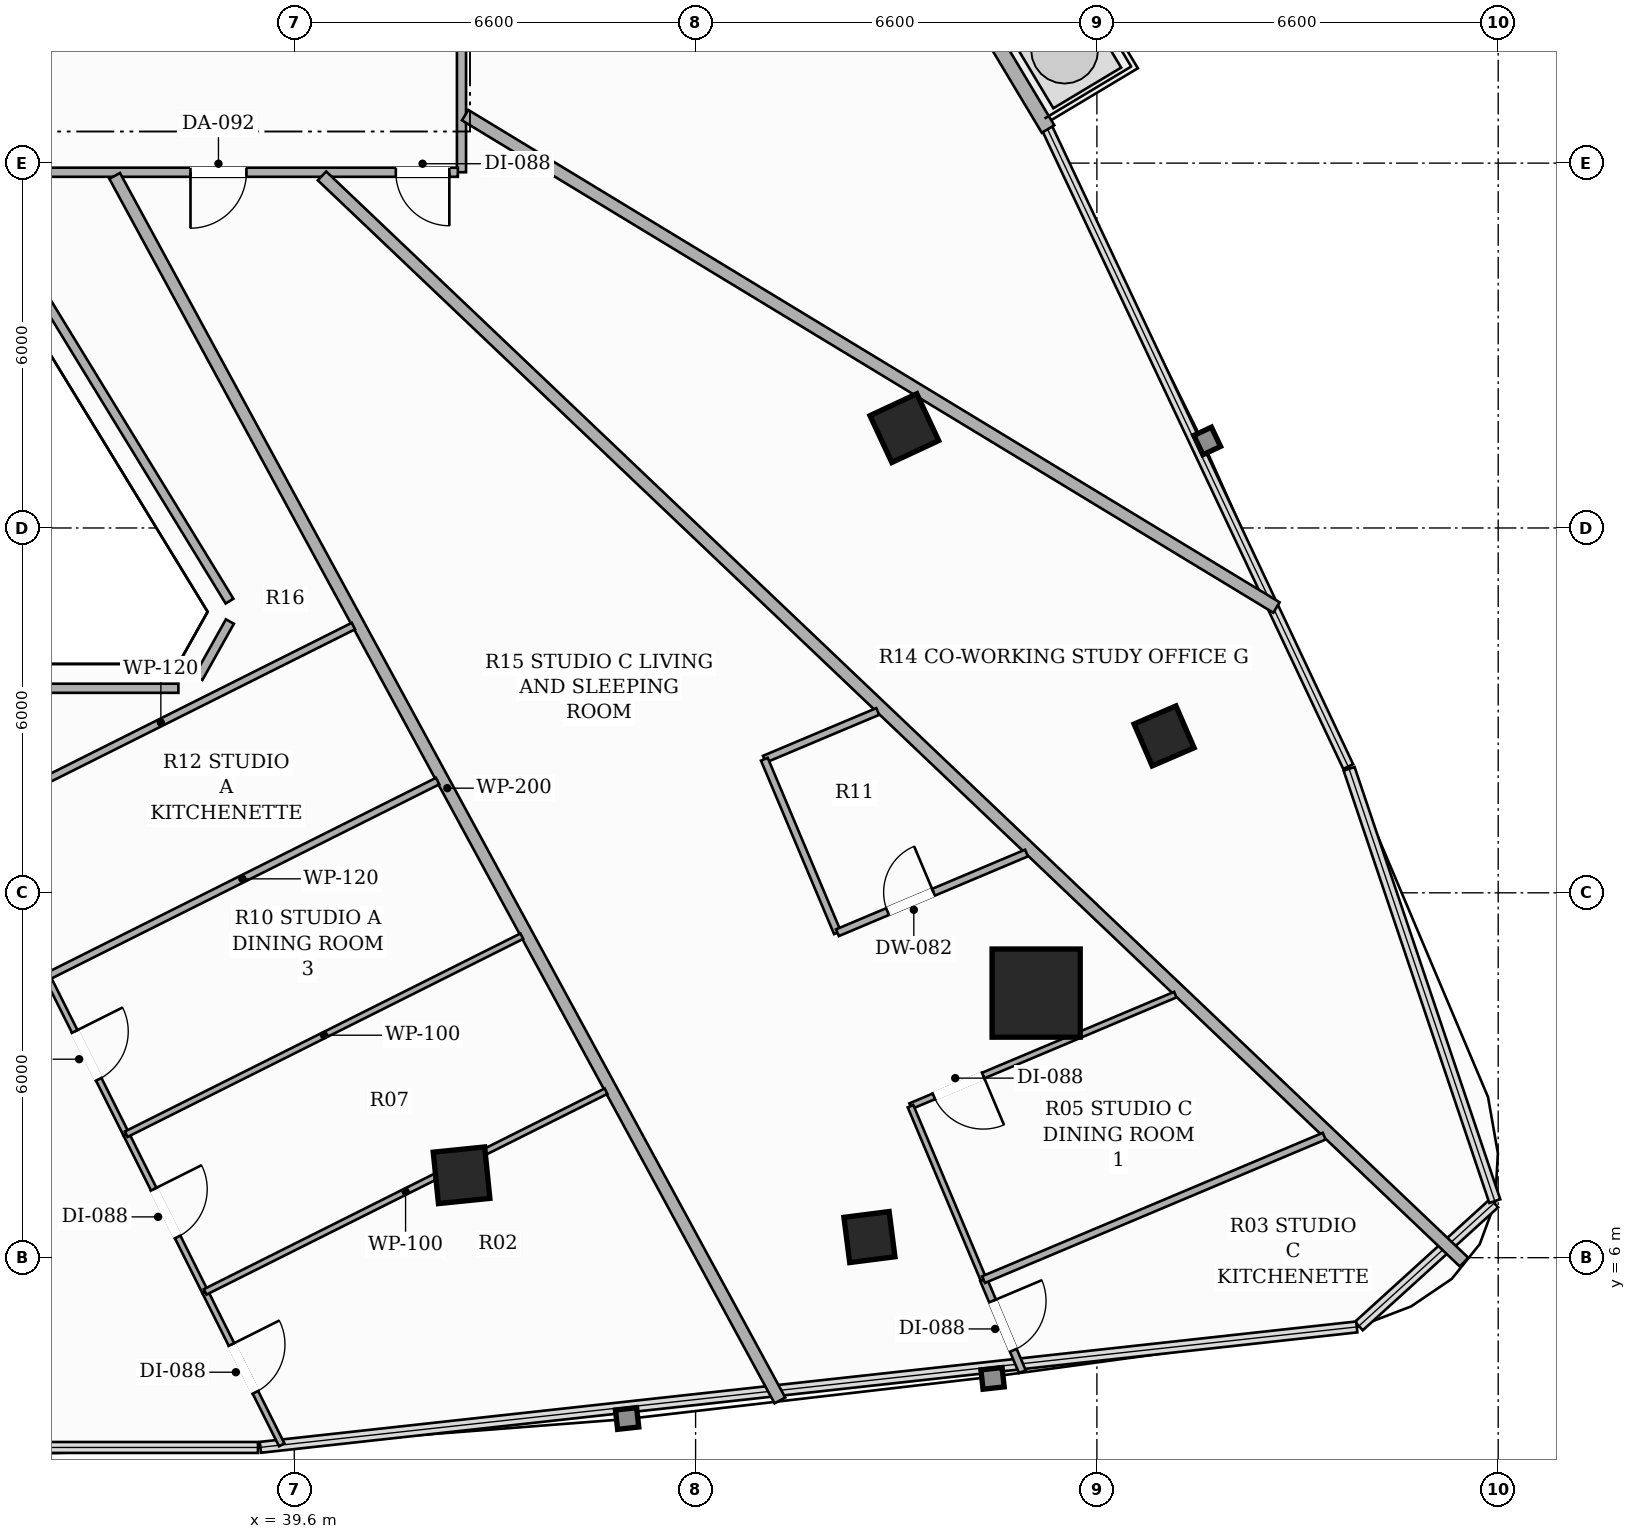
"""IFC4 building model, lengths in metres.
Left out: names, types, materials, properties, quantities, classifications, styles, units other than length and angle.
Written with IfcOpenShell. Run it as: python <this file> out.ifc"""

import sys

from ifc_helpers import new_model, si_unit, direction, frame, frame_2d, origin, origin_2d, place, context, subcontext, project, spatial, rectangle, hollow_rectangle, extrude, element, fill, save


model = new_model("IFC4")
c1 = context("Model", 3, precision=1e-05, world=origin(), true_north=direction((0.0, 1.0)))
c2 = subcontext(c1, "Body", "Model", "MODEL_VIEW")
j1 = project(units=[si_unit("LENGTHUNIT", "METRE"), si_unit("PLANEANGLEUNIT", "RADIAN")], contexts=[c1])
p1 = place(None, origin())
s1 = spatial("IfcSite", under=j1, at=p1, CompositionType="ELEMENT")
p2 = place(p1, origin())
s2 = spatial("IfcBuilding", under=s1, at=p2, CompositionType="ELEMENT")
p3 = place(p2, frame((0.0, 0.0, 113.3)))
s3 = spatial("IfcBuildingStorey", under=s2, at=p3, CompositionType="ELEMENT", Elevation=113.3)
p4 = place(p3, frame((51.801, 10.351, 0.0), z_axis=(0.0, 0.0, 1.0), x_axis=(1.0, 0.0, 0.0)))
e1 = element("IfcColumn", 1, at=p4, inside=s3, PredefinedType="COLUMN", context=c2, shape_type="SweptSolid", body=[
    extrude(hollow_rectangle(XDim=1.45, YDim=1.45, WallThickness=0.045, at=origin_2d()), origin(), (0.0, 0.0, 1.0), 3.3),
])
for number, where, z_axis, x_axis in (
    (2, (42.351, 7.355, 0.0), (0.0, 0.0, 1.0), (0.995, 0.101, 0.0)),
    (3, (49.633, 19.642, 0.0), (0.0, 0.0, 1.0), (-0.423, 0.906, 0.0)),
):
    element("IfcColumn", number, at=place(p3, frame(where, z_axis=z_axis, x_axis=x_axis)), inside=s3, PredefinedType="COLUMN", context=c2, shape_type="SweptSolid", body=[
        extrude(hollow_rectangle(XDim=0.85, YDim=0.85, WallThickness=0.028, at=origin_2d()), origin(), (0.0, 0.0, 1.0), 3.3),
    ])
for number, where, z_axis, x_axis in (
    (4, (49.059, 6.339, 0.0), (0.0, 0.0, 1.0), (0.992, 0.127, 0.0)),
    (5, (53.905, 14.58, 0.0), (0.0, 0.0, 1.0), (-0.397, 0.918, 0.0)),
):
    element("IfcColumn", number, at=place(p3, frame(where, z_axis=z_axis, x_axis=x_axis)), inside=s3, PredefinedType="COLUMN", context=c2, shape_type="SweptSolid", body=[
        extrude(hollow_rectangle(XDim=0.75, YDim=0.75, WallThickness=0.025, at=origin_2d()), origin(), (0.0, 0.0, 1.0), 3.3),
    ])
p5 = place(p3, frame((51.997, 24.561, 0.0), z_axis=(0.0, 0.0, 1.0), x_axis=(-0.514362369366, 0.857572943242, 0.0)))
e6 = element("IfcWall", 6, at=p5, inside=s3, PredefinedType="SOLIDWALL", context=c2, shape_type="SweptSolid", body=[
    extrude(rectangle(XDim=11.844, YDim=0.24, at=frame_2d((5.922, 0.0))), origin(), (0.0, 0.0, 1.0), 2.624),
])
p6 = place(p5, frame((9.346, 0.0, 0.0)))
e7 = element("IfcOpeningElement", 7, at=p6, cuts=e6, PredefinedType="OPENING", context=c2, shape_type="SweptSolid", body=[
    extrude(rectangle(XDim=1.8, YDim=2.2, at=frame_2d((0.9, 1.1))), frame((0.0, 0.13, 0.0), z_axis=(0.0, -1.0, 0.0), x_axis=(1.0, 0.0, 0.0)), (0.0, 0.0, 1.0), 0.26),
])
p7 = place(p3, frame((42.35, 28.34, 0.0), z_axis=(0.0, 0.0, 1.0), x_axis=(0.0, -1.0, 0.0)))
e8 = element("IfcWall", 8, at=p7, inside=s3, PredefinedType="PARTITIONING", context=c2, shape_type="SweptSolid", body=[
    extrude(rectangle(XDim=4.49, YDim=0.15, at=frame_2d((2.245, 0.0))), origin(), (0.0, 0.0, 1.0), 2.721),
])
p8 = place(p7, frame((1.486, 0.0, 0.0)))
e9 = element("IfcOpeningElement", 9, at=p8, cuts=e8, PredefinedType="OPENING", context=c2, shape_type="SweptSolid", body=[
    extrude(rectangle(XDim=0.88, YDim=2.1, at=frame_2d((0.44, 1.05))), frame((0.0, 0.085, 0.0), z_axis=(0.0, -1.0, 0.0), x_axis=(1.0, 0.0, 0.0)), (0.0, 0.0, 1.0), 0.17),
])
p9 = place(p3, frame((42.29, 23.85, 0.0), z_axis=(0.0, 0.0, 1.0), x_axis=(-1.0, 0.0, 0.0)))
e10 = element("IfcWall", 10, at=p9, inside=s3, PredefinedType="PARTITIONING", context=c2, shape_type="SweptSolid", body=[
    extrude(rectangle(XDim=8.065, YDim=0.15, at=frame_2d((4.032, 0.0))), origin(), (0.0, 0.0, 1.0), 2.492),
])
p10 = place(p9, frame((3.477, 0.0, 0.0)))
e11 = element("IfcOpeningElement", 11, at=p10, cuts=e10, PredefinedType="OPENING", context=c2, shape_type="SweptSolid", body=[
    extrude(rectangle(XDim=0.92, YDim=2.15, at=frame_2d((0.46, 1.075))), frame((0.0, 0.085, 0.0), z_axis=(0.0, -1.0, 0.0), x_axis=(1.0, 0.0, 0.0)), (0.0, 0.0, 1.0), 0.17),
])
p11 = place(p9, frame((0.14, 0.0, 0.0)))
e12 = element("IfcOpeningElement", 12, at=p11, cuts=e10, PredefinedType="OPENING", context=c2, shape_type="SweptSolid", body=[
    extrude(rectangle(XDim=0.88, YDim=2.1, at=frame_2d((0.44, 1.05))), frame((0.0, 0.085, 0.0), z_axis=(0.0, -1.0, 0.0), x_axis=(1.0, 0.0, 0.0)), (0.0, 0.0, 1.0), 0.17),
])
p12 = place(p3, frame((34.257, 23.79, 0.0), z_axis=(0.0, 0.0, 1.0), x_axis=(0.521839061235, -0.853043957935, 0.0)))
e13 = element("IfcWall", 13, at=p12, inside=s3, PredefinedType="PARTITIONING", context=c2, shape_type="SweptSolid", body=[
    extrude(rectangle(XDim=8.198, YDim=0.15, at=frame_2d((4.099, 0.0))), origin(), (0.0, 0.0, 1.0), 2.721),
])
p13 = place(p3, frame((38.541, 16.461, 0.0), z_axis=(0.0, 0.0, 1.0), x_axis=(-0.488631416095, -0.872490308946, 0.0)))
e14 = element("IfcWall", 14, at=p13, inside=s3, PredefinedType="PARTITIONING", context=c2, shape_type="SweptSolid", body=[
    extrude(rectangle(XDim=1.06, YDim=0.15, at=frame_2d((0.53, 0.0))), origin(), (0.0, 0.0, 1.0), 3.06),
])
p14 = place(p3, frame((37.694, 15.364, 0.0), z_axis=(0.0, 0.0, 1.0), x_axis=(-1.0, 0.0, 0.0)))
e15 = element("IfcWall", 15, at=p14, inside=s3, PredefinedType="PARTITIONING", context=c2, shape_type="SweptSolid", body=[
    extrude(rectangle(XDim=9.388, YDim=0.15, at=frame_2d((4.694, 0.0))), origin(), (0.0, 0.0, 1.0), 2.721),
])
p15 = place(p3, frame((36.646, 23.79, 0.0), z_axis=(0.0, 0.0, 1.0), x_axis=(0.477391569207, -0.878690667784, 0.0)))
e16 = element("IfcWall", 16, at=p15, inside=s3, PredefinedType="PARTITIONING", context=c2, shape_type="SweptSolid", body=[
    extrude(rectangle(XDim=22.918, YDim=0.2, at=frame_2d((11.459, 0.0))), origin(), (0.0, 0.0, 1.0), 2.413),
])
p16 = place(p3, frame((40.056, 23.79, 0.0), z_axis=(0.0, 0.0, 1.0), x_axis=(0.724633427165, -0.68913452695, 0.0)))
e17 = element("IfcWall", 17, at=p16, inside=s3, PredefinedType="PARTITIONING", context=c2, shape_type="SweptSolid", body=[
    extrude(rectangle(XDim=25.921, YDim=0.2, at=frame_2d((12.96, 0.0))), origin(), (0.0, 0.0, 1.0), 2.413),
])
p17 = place(p3, frame((55.753, 16.692, 0.0), z_axis=(0.0, 0.0, 1.0), x_axis=(-0.85489976131, 0.518793213248, 0.0)))
e18 = element("IfcWall", 18, at=p17, inside=s3, PredefinedType="PARTITIONING", context=c2, shape_type="SweptSolid", body=[
    extrude(rectangle(XDim=15.608, YDim=0.2, at=frame_2d((7.804, 0.0))), origin(), (0.0, 0.0, 1.0), 2.413),
])
p18 = place(p3, frame((38.134, 5.437, 0.0), z_axis=(0.0, 0.0, 1.0), x_axis=(0.447768773835, -0.894149386388, 0.0)))
e19 = element("IfcWall", 19, at=p18, inside=s3, PredefinedType="PARTITIONING", context=c2, shape_type="SweptSolid", body=[
    extrude(rectangle(XDim=2.814, YDim=0.1, at=frame_2d((1.407, 0.0))), origin(), (0.0, 0.0, 1.0), 3.06),
])
p19 = place(p18, frame((0.967, 0.0, 0.0)))
e20 = element("IfcOpeningElement", 20, at=p19, cuts=e19, PredefinedType="OPENING", context=c2, shape_type="SweptSolid", body=[
    extrude(rectangle(XDim=0.88, YDim=2.1, at=frame_2d((0.44, 1.05))), frame((0.0, 0.06, 0.0), z_axis=(0.0, -1.0, 0.0), x_axis=(1.0, 0.0, 0.0)), (0.0, 0.0, 1.0), 0.12),
])
p20 = place(p3, frame((36.836, 8.03, 0.0), z_axis=(0.0, 0.0, 1.0), x_axis=(0.447651342751, -0.894208183441, 0.0)))
e21 = element("IfcWall", 21, at=p20, inside=s3, PredefinedType="PARTITIONING", context=c2, shape_type="SweptSolid", body=[
    extrude(rectangle(XDim=2.9, YDim=0.1, at=frame_2d((1.45, 0.0))), origin(), (0.0, 0.0, 1.0), 2.413),
])
p21 = place(p20, frame((1.01, 0.0, 0.0)))
e22 = element("IfcOpeningElement", 22, at=p21, cuts=e21, PredefinedType="OPENING", context=c2, shape_type="SweptSolid", body=[
    extrude(rectangle(XDim=0.88, YDim=2.1, at=frame_2d((0.44, 1.05))), frame((0.0, 0.06, 0.0), z_axis=(0.0, -1.0, 0.0), x_axis=(1.0, 0.0, 0.0)), (0.0, 0.0, 1.0), 0.12),
])
p22 = place(p3, frame((35.537, 10.623, 0.0), z_axis=(0.0, 0.0, 1.0), x_axis=(0.447853271476, -0.894107066983, 0.0)))
e23 = element("IfcWall", 23, at=p22, inside=s3, PredefinedType="PARTITIONING", context=c2, shape_type="SweptSolid", body=[
    extrude(rectangle(XDim=2.9, YDim=0.1, at=frame_2d((1.45, 0.0))), origin(), (0.0, 0.0, 1.0), 3.06),
])
p23 = place(p22, frame((1.01, 0.0, 0.0)))
e24 = element("IfcOpeningElement", 24, at=p23, cuts=e23, PredefinedType="OPENING", context=c2, shape_type="SweptSolid", body=[
    extrude(rectangle(XDim=0.88, YDim=2.1, at=frame_2d((0.44, 1.05))), frame((0.0, 0.06, 0.0), z_axis=(0.0, -1.0, 0.0), x_axis=(1.0, 0.0, 0.0)), (0.0, 0.0, 1.0), 0.12),
])
p24 = place(p3, frame((40.572, 16.387, 0.0), z_axis=(0.0, 0.0, 1.0), x_axis=(-0.894178861749, -0.447709909653, 0.0)))
e25 = element("IfcWall", 25, at=p24, inside=s3, PredefinedType="PARTITIONING", context=c2, shape_type="SweptSolid", body=[
    extrude(rectangle(XDim=7.083, YDim=0.12, at=frame_2d((3.541, 0.0))), origin(), (0.0, 0.0, 1.0), 2.721),
])
p25 = place(p3, frame((41.957, 13.837, 0.0), z_axis=(0.0, 0.0, 1.0), x_axis=(-0.894209449688, -0.447648813344, 0.0)))
e26 = element("IfcWall", 26, at=p25, inside=s3, PredefinedType="PARTITIONING", context=c2, shape_type="SweptSolid", body=[
    extrude(rectangle(XDim=7.179, YDim=0.12, at=frame_2d((3.59, 0.0))), origin(), (0.0, 0.0, 1.0), 2.721),
])
p26 = place(p3, frame((38.134, 5.437, 0.0), z_axis=(0.0, 0.0, 1.0), x_axis=(0.894182030014, 0.447703581849, 0.0)))
e27 = element("IfcWall", 27, at=p26, inside=s3, PredefinedType="PARTITIONING", context=c2, shape_type="SweptSolid", body=[
    extrude(rectangle(XDim=7.373, YDim=0.1, at=frame_2d((3.687, 0.0))), origin(), (0.0, 0.0, 1.0), 2.413),
])
p27 = place(p3, frame((36.836, 8.03, 0.0), z_axis=(0.0, 0.0, 1.0), x_axis=(0.894205618721, 0.447656465884, 0.0)))
e28 = element("IfcWall", 28, at=p27, inside=s3, PredefinedType="PARTITIONING", context=c2, shape_type="SweptSolid", body=[
    extrude(rectangle(XDim=7.276, YDim=0.1, at=frame_2d((3.638, 0.0))), origin(), (0.0, 0.0, 1.0), 2.721),
])
p28 = place(p3, frame((49.195, 14.982, 0.0), z_axis=(0.0, 0.0, 1.0), x_axis=(-0.921624013763, -0.38808398222, 0.0)))
e29 = element("IfcWall", 29, at=p28, inside=s3, PredefinedType="PARTITIONING", context=c2, shape_type="SweptSolid", body=[
    extrude(rectangle(XDim=2.022, YDim=0.12, at=frame_2d((1.011, 0.0))), origin(), (0.0, 0.0, 1.0), 2.492),
])
p29 = place(p3, frame((47.331, 14.197, 0.0), z_axis=(0.0, 0.0, 1.0), x_axis=(0.388229743903, -0.921562621827, 0.0)))
e30 = element("IfcWall", 30, at=p29, inside=s3, PredefinedType="PARTITIONING", context=c2, shape_type="SweptSolid", body=[
    extrude(rectangle(XDim=3.096, YDim=0.12, at=frame_2d((1.548, 0.0))), origin(), (0.0, 0.0, 1.0), 3.06),
])
p30 = place(p3, frame((48.533, 11.344, 0.0), z_axis=(0.0, 0.0, 1.0), x_axis=(0.921534547548, 0.388296378653, 0.0)))
e31 = element("IfcWall", 31, at=p30, inside=s3, PredefinedType="PARTITIONING", context=c2, shape_type="SweptSolid", body=[
    extrude(rectangle(XDim=3.374, YDim=0.12, at=frame_2d((1.687, 0.0))), origin(), (0.0, 0.0, 1.0), 2.492),
])
p31 = place(p30, frame((0.894, 0.0, 0.0)))
e32 = element("IfcOpeningElement", 32, at=p31, cuts=e31, PredefinedType="OPENING", context=c2, shape_type="SweptSolid", body=[
    extrude(rectangle(XDim=0.82, YDim=2.1, at=frame_2d((0.41, 1.05))), frame((0.0, 0.07, 0.0), z_axis=(0.0, -1.0, 0.0), x_axis=(1.0, 0.0, 0.0)), (0.0, 0.0, 1.0), 0.14),
])
p32 = place(p3, frame((50.936, 5.639, 0.0), z_axis=(0.0, 0.0, 1.0), x_axis=(0.3883160894, -0.92152624201, 0.0)))
e33 = element("IfcWall", 33, at=p32, inside=s3, PredefinedType="PARTITIONING", context=c2, shape_type="SweptSolid", body=[
    extrude(rectangle(XDim=1.643, YDim=0.12, at=frame_2d((0.821, 0.0))), origin(), (0.0, 0.0, 1.0), 2.619),
])
p33 = place(p32, frame((0.381, 0.0, 0.0)))
e34 = element("IfcOpeningElement", 34, at=p33, cuts=e33, PredefinedType="OPENING", context=c2, shape_type="SweptSolid", body=[
    extrude(rectangle(XDim=0.88, YDim=2.1, at=frame_2d((0.44, 1.05))), frame((0.0, 0.07, 0.0), z_axis=(0.0, -1.0, 0.0), x_axis=(1.0, 0.0, 0.0)), (0.0, 0.0, 1.0), 0.14),
])
p34 = place(p3, frame((54.09, 10.326, 0.0), z_axis=(0.0, 0.0, 1.0), x_axis=(-0.921538100995, -0.388287945234, 0.0)))
e35 = element("IfcWall", 35, at=p34, inside=s3, PredefinedType="PARTITIONING", context=c2, shape_type="SweptSolid", body=[
    extrude(rectangle(XDim=4.726, YDim=0.1, at=frame_2d((2.363, 0.0))), origin(), (0.0, 0.0, 1.0), 2.413),
])
p35 = place(p34, frame((3.429, 0.0, 0.0)))
e36 = element("IfcOpeningElement", 36, at=p35, cuts=e35, PredefinedType="OPENING", context=c2, shape_type="SweptSolid", body=[
    extrude(rectangle(XDim=0.88, YDim=2.1, at=frame_2d((0.44, 1.05))), frame((0.0, 0.06, 0.0), z_axis=(0.0, -1.0, 0.0), x_axis=(1.0, 0.0, 0.0)), (0.0, 0.0, 1.0), 0.12),
])
p36 = place(p3, frame((49.735, 8.491, 0.0), z_axis=(0.0, 0.0, 1.0), x_axis=(0.388074634892, -0.921627949746, 0.0)))
e37 = element("IfcWall", 37, at=p36, inside=s3, PredefinedType="PARTITIONING", context=c2, shape_type="SweptSolid", body=[
    extrude(rectangle(XDim=3.094, YDim=0.1, at=frame_2d((1.547, 0.0))), origin(), (0.0, 0.0, 1.0), 2.413),
])
p37 = place(p3, frame((50.936, 5.639, 0.0), z_axis=(0.0, 0.0, 1.0), x_axis=(0.921613448603, 0.388109071466, 0.0)))
e38 = element("IfcWall", 38, at=p37, inside=s3, PredefinedType="PARTITIONING", context=c2, shape_type="SweptSolid", body=[
    extrude(rectangle(XDim=6.079, YDim=0.12, at=frame_2d((3.039, 0.0))), origin(), (0.0, 0.0, 1.0), 2.619),
])
p38 = place(p19, origin())
e39 = element("IfcDoor", 39, at=p38, inside=s3, OperationType="SINGLE_SWING_LEFT", PredefinedType="DOOR", context=c2, shape_type="SweptSolid", body=[
    extrude(rectangle(XDim=0.88, YDim=2.1, at=frame_2d((0.44, 1.05))), frame((0.0, 0.025, 0.0), z_axis=(0.0, -1.0, 0.0), x_axis=(1.0, 0.0, 0.0)), (0.0, 0.0, 1.0), 0.05),
])
fill(e20, e39)
p39 = place(p21, origin())
e40 = element("IfcDoor", 40, at=p39, inside=s3, OperationType="SINGLE_SWING_LEFT", PredefinedType="DOOR", context=c2, shape_type="SweptSolid", body=[
    extrude(rectangle(XDim=0.88, YDim=2.1, at=frame_2d((0.44, 1.05))), frame((0.0, 0.025, 0.0), z_axis=(0.0, -1.0, 0.0), x_axis=(1.0, 0.0, 0.0)), (0.0, 0.0, 1.0), 0.05),
])
fill(e22, e40)
p40 = place(p23, origin())
e41 = element("IfcDoor", 41, at=p40, inside=s3, OperationType="SINGLE_SWING_LEFT", PredefinedType="DOOR", context=c2, shape_type="SweptSolid", body=[
    extrude(rectangle(XDim=0.88, YDim=2.1, at=frame_2d((0.44, 1.05))), frame((0.0, 0.025, 0.0), z_axis=(0.0, -1.0, 0.0), x_axis=(1.0, 0.0, 0.0)), (0.0, 0.0, 1.0), 0.05),
])
fill(e24, e41)
p41 = place(p10, origin())
e42 = element("IfcDoor", 42, at=p41, inside=s3, OperationType="SINGLE_SWING_RIGHT", PredefinedType="DOOR", context=c2, shape_type="SweptSolid", body=[
    extrude(rectangle(XDim=0.92, YDim=2.15, at=frame_2d((0.46, 1.075))), frame((0.0, 0.025, 0.0), z_axis=(0.0, -1.0, 0.0), x_axis=(1.0, 0.0, 0.0)), (0.0, 0.0, 1.0), 0.05),
])
fill(e11, e42)
p42 = place(p31, origin())
e43 = element("IfcDoor", 43, at=p42, inside=s3, OperationType="SINGLE_SWING_RIGHT", PredefinedType="DOOR", context=c2, shape_type="SweptSolid", body=[
    extrude(rectangle(XDim=0.82, YDim=2.1, at=frame_2d((0.41, 1.05))), frame((0.0, 0.025, 0.0), z_axis=(0.0, -1.0, 0.0), x_axis=(1.0, 0.0, 0.0)), (0.0, 0.0, 1.0), 0.05),
])
fill(e32, e43)
p43 = place(p33, origin())
e44 = element("IfcDoor", 44, at=p43, inside=s3, OperationType="SINGLE_SWING_LEFT", PredefinedType="DOOR", context=c2, shape_type="SweptSolid", body=[
    extrude(rectangle(XDim=0.88, YDim=2.1, at=frame_2d((0.44, 1.05))), frame((0.0, 0.025, 0.0), z_axis=(0.0, -1.0, 0.0), x_axis=(1.0, 0.0, 0.0)), (0.0, 0.0, 1.0), 0.05),
])
fill(e34, e44)
p44 = place(p35, origin())
e45 = element("IfcDoor", 45, at=p44, inside=s3, OperationType="SINGLE_SWING_LEFT", PredefinedType="DOOR", context=c2, shape_type="SweptSolid", body=[
    extrude(rectangle(XDim=0.88, YDim=2.1, at=frame_2d((0.44, 1.05))), frame((0.0, 0.025, 0.0), z_axis=(0.0, -1.0, 0.0), x_axis=(1.0, 0.0, 0.0)), (0.0, 0.0, 1.0), 0.05),
])
fill(e36, e45)
p45 = place(p11, origin())
e46 = element("IfcDoor", 46, at=p45, inside=s3, OperationType="SINGLE_SWING_LEFT", PredefinedType="DOOR", context=c2, shape_type="SweptSolid", body=[
    extrude(rectangle(XDim=0.88, YDim=2.1, at=frame_2d((0.44, 1.05))), frame((0.0, 0.025, 0.0), z_axis=(0.0, -1.0, 0.0), x_axis=(1.0, 0.0, 0.0)), (0.0, 0.0, 1.0), 0.05),
])
fill(e12, e46)
save(model, sys.argv[1])
